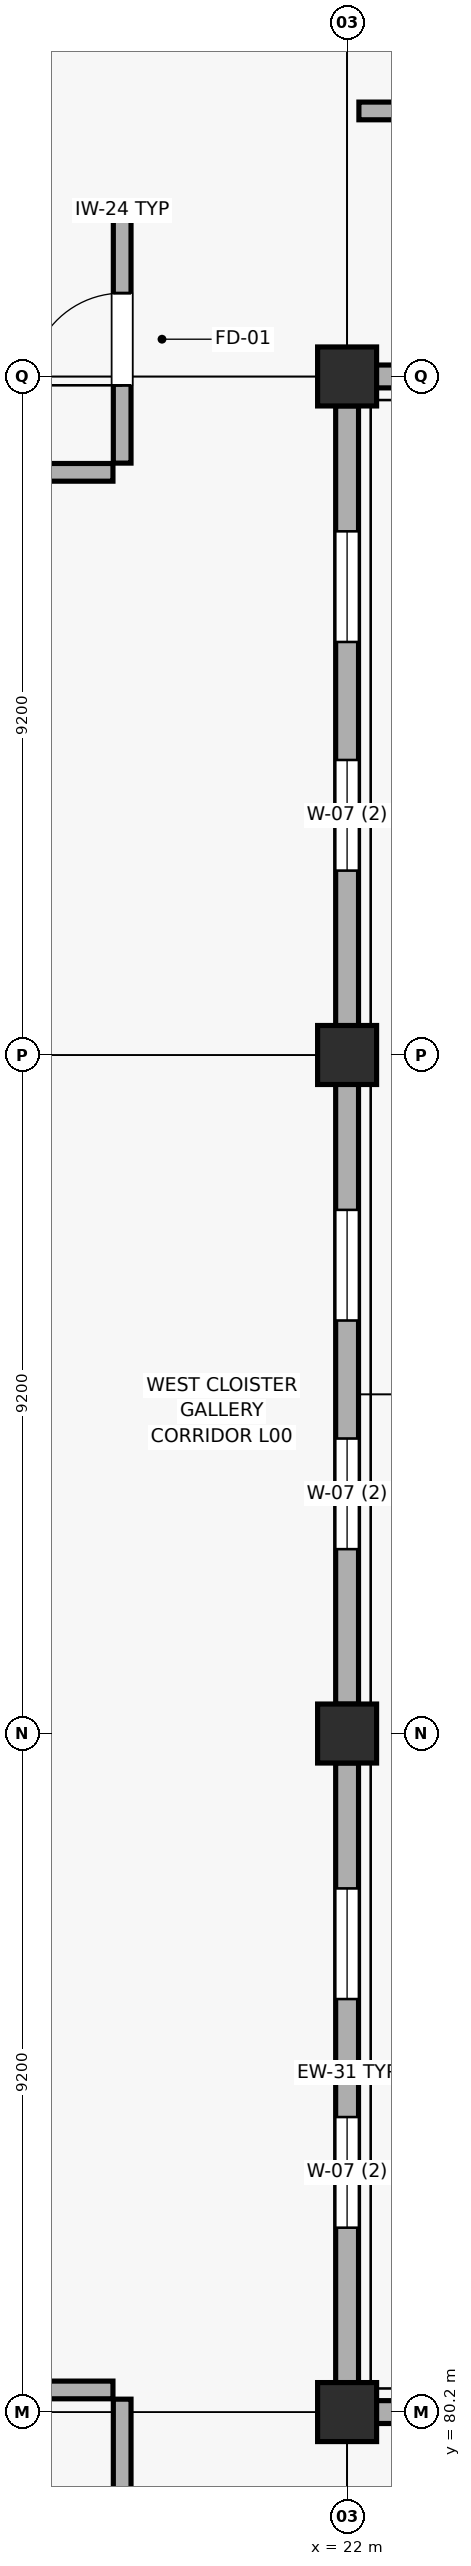
"""IFC4 building model, lengths in metres.
Left out: names, types, materials, properties, quantities, classifications, styles, units other than length and angle.
Written with IfcOpenShell. Run it as: python <this file> out.ifc"""

import sys

from ifc_helpers import new_model, si_unit, direction, frame, frame_2d, origin, origin_2d, place, context, subcontext, project, spatial, rectangle, extrude, element, fill, save


model = new_model("IFC4")
c1 = context("Model", 3, precision=1e-05, world=origin(), true_north=direction((0.0, 1.0)))
c2 = subcontext(c1, "Body", "Model", "MODEL_VIEW")
j1 = project(units=[si_unit("LENGTHUNIT", "METRE"), si_unit("PLANEANGLEUNIT", "RADIAN")], contexts=[c1])
p1 = place(None, origin())
s1 = spatial("IfcSite", under=j1, at=p1, CompositionType="ELEMENT")
p2 = place(p1, origin())
s2 = spatial("IfcBuilding", under=s1, at=p2, CompositionType="ELEMENT")
p3 = place(p2, origin())
s3 = spatial("IfcBuildingStorey", under=s2, at=p3, CompositionType="ELEMENT", Elevation=0.0)
for number, where, z_axis, x_axis in (
    (1, (22.0, 80.2, 0.0), (0.0, 0.0, 1.0), (1.0, 0.0, 0.0)),
    (2, (22.0, 89.4, 0.0), (0.0, 0.0, 1.0), (1.0, 0.0, 0.0)),
    (3, (22.0, 98.6, 0.0), (0.0, 0.0, 1.0), (1.0, 0.0, 0.0)),
    (4, (22.0, 107.8, 0.0), (0.0, 0.0, 1.0), (1.0, 0.0, 0.0)),
):
    element("IfcColumn", number, at=place(p3, frame(where, z_axis=z_axis, x_axis=x_axis)), inside=s3, PredefinedType="COLUMN", context=c2, shape_type="SweptSolid", body=[
        extrude(rectangle(XDim=0.8, YDim=0.8, at=origin_2d()), origin(), (0.0, 0.0, 1.0), 5.4),
    ])
p4 = place(p3, frame((22.398, 80.2, 0.0), z_axis=(0.0, 0.0, 1.0), x_axis=(1.0, 0.0, 0.0)))
e5 = element("IfcWall", 5, at=p4, inside=s3, PredefinedType="SOLIDWALL", context=c2, shape_type="SweptSolid", body=[
    extrude(rectangle(XDim=10.586, YDim=0.31, at=frame_2d((5.293, 0.0))), origin(), (0.0, 0.0, 1.0), 4.425),
])
p5 = place(p4, frame((2.302, 0.0, 0.95)))
e6 = element("IfcOpeningElement", 6, at=p5, cuts=e5, PredefinedType="OPENING", context=c2, shape_type="SweptSolid", body=[
    extrude(rectangle(XDim=1.65, YDim=2.25, at=frame_2d((0.825, 1.125))), frame((0.0, 0.165, 0.0), z_axis=(0.0, -1.0, 0.0), x_axis=(1.0, 0.0, 0.0)), (0.0, 0.0, 1.0), 0.33),
])
p6 = place(p4, frame((5.902, 0.0, 0.95)))
e7 = element("IfcOpeningElement", 7, at=p6, cuts=e5, PredefinedType="OPENING", context=c2, shape_type="SweptSolid", body=[
    extrude(rectangle(XDim=1.65, YDim=2.25, at=frame_2d((0.825, 1.125))), frame((0.0, 0.165, 0.0), z_axis=(0.0, -1.0, 0.0), x_axis=(1.0, 0.0, 0.0)), (0.0, 0.0, 1.0), 0.33),
])
p7 = place(p3, frame((22.398, 107.8, 0.0), z_axis=(0.0, 0.0, 1.0), x_axis=(1.0, 0.0, 0.0)))
e8 = element("IfcWall", 8, at=p7, inside=s3, PredefinedType="SOLIDWALL", context=c2, shape_type="SweptSolid", body=[
    extrude(rectangle(XDim=10.586, YDim=0.31, at=frame_2d((5.293, 0.0))), origin(), (0.0, 0.0, 1.0), 4.425),
])
p8 = place(p7, frame((2.302, 0.0, 0.95)))
e9 = element("IfcOpeningElement", 9, at=p8, cuts=e8, PredefinedType="OPENING", context=c2, shape_type="SweptSolid", body=[
    extrude(rectangle(XDim=1.65, YDim=2.25, at=frame_2d((0.825, 1.125))), frame((0.0, 0.165, 0.0), z_axis=(0.0, -1.0, 0.0), x_axis=(1.0, 0.0, 0.0)), (0.0, 0.0, 1.0), 0.33),
])
p9 = place(p7, frame((5.902, 0.0, 0.95)))
e10 = element("IfcOpeningElement", 10, at=p9, cuts=e8, PredefinedType="OPENING", context=c2, shape_type="SweptSolid", body=[
    extrude(rectangle(XDim=1.65, YDim=2.25, at=frame_2d((0.825, 1.125))), frame((0.0, 0.165, 0.0), z_axis=(0.0, -1.0, 0.0), x_axis=(1.0, 0.0, 0.0)), (0.0, 0.0, 1.0), 0.33),
])
p10 = place(p3, frame((22.0, 80.598, 0.0), z_axis=(0.0, 0.0, 1.0), x_axis=(0.0, 1.0, 0.0)))
e11 = element("IfcWall", 11, at=p10, inside=s3, PredefinedType="SOLIDWALL", context=c2, shape_type="SweptSolid", body=[
    extrude(rectangle(XDim=8.404, YDim=0.31, at=frame_2d((4.202, 0.0))), origin(), (0.0, 0.0, 1.0), 4.525),
])
p11 = place(p10, frame((2.102, 0.0, 0.95)))
e12 = element("IfcOpeningElement", 12, at=p11, cuts=e11, PredefinedType="OPENING", context=c2, shape_type="SweptSolid", body=[
    extrude(rectangle(XDim=1.5, YDim=2.25, at=frame_2d((0.75, 1.125))), frame((0.0, 0.165, 0.0), z_axis=(0.0, -1.0, 0.0), x_axis=(1.0, 0.0, 0.0)), (0.0, 0.0, 1.0), 0.33),
])
p12 = place(p10, frame((5.202, 0.0, 0.95)))
e13 = element("IfcOpeningElement", 13, at=p12, cuts=e11, PredefinedType="OPENING", context=c2, shape_type="SweptSolid", body=[
    extrude(rectangle(XDim=1.5, YDim=2.25, at=frame_2d((0.75, 1.125))), frame((0.0, 0.165, 0.0), z_axis=(0.0, -1.0, 0.0), x_axis=(1.0, 0.0, 0.0)), (0.0, 0.0, 1.0), 0.33),
])
p13 = place(p3, frame((22.0, 89.798, 0.0), z_axis=(0.0, 0.0, 1.0), x_axis=(0.0, 1.0, 0.0)))
e14 = element("IfcWall", 14, at=p13, inside=s3, PredefinedType="SOLIDWALL", context=c2, shape_type="SweptSolid", body=[
    extrude(rectangle(XDim=8.404, YDim=0.31, at=frame_2d((4.202, 0.0))), origin(), (0.0, 0.0, 1.0), 4.525),
])
p14 = place(p13, frame((2.102, 0.0, 0.95)))
e15 = element("IfcOpeningElement", 15, at=p14, cuts=e14, PredefinedType="OPENING", context=c2, shape_type="SweptSolid", body=[
    extrude(rectangle(XDim=1.5, YDim=2.25, at=frame_2d((0.75, 1.125))), frame((0.0, 0.165, 0.0), z_axis=(0.0, -1.0, 0.0), x_axis=(1.0, 0.0, 0.0)), (0.0, 0.0, 1.0), 0.33),
])
p15 = place(p13, frame((5.202, 0.0, 0.95)))
e16 = element("IfcOpeningElement", 16, at=p15, cuts=e14, PredefinedType="OPENING", context=c2, shape_type="SweptSolid", body=[
    extrude(rectangle(XDim=1.5, YDim=2.25, at=frame_2d((0.75, 1.125))), frame((0.0, 0.165, 0.0), z_axis=(0.0, -1.0, 0.0), x_axis=(1.0, 0.0, 0.0)), (0.0, 0.0, 1.0), 0.33),
])
p16 = place(p3, frame((22.0, 98.998, 0.0), z_axis=(0.0, 0.0, 1.0), x_axis=(0.0, 1.0, 0.0)))
e17 = element("IfcWall", 17, at=p16, inside=s3, PredefinedType="SOLIDWALL", context=c2, shape_type="SweptSolid", body=[
    extrude(rectangle(XDim=8.404, YDim=0.31, at=frame_2d((4.202, 0.0))), origin(), (0.0, 0.0, 1.0), 4.525),
])
p17 = place(p16, frame((2.102, 0.0, 0.95)))
e18 = element("IfcOpeningElement", 18, at=p17, cuts=e17, PredefinedType="OPENING", context=c2, shape_type="SweptSolid", body=[
    extrude(rectangle(XDim=1.5, YDim=2.25, at=frame_2d((0.75, 1.125))), frame((0.0, 0.165, 0.0), z_axis=(0.0, -1.0, 0.0), x_axis=(1.0, 0.0, 0.0)), (0.0, 0.0, 1.0), 0.33),
])
p18 = place(p16, frame((5.202, 0.0, 0.95)))
e19 = element("IfcOpeningElement", 19, at=p18, cuts=e17, PredefinedType="OPENING", context=c2, shape_type="SweptSolid", body=[
    extrude(rectangle(XDim=1.5, YDim=2.25, at=frame_2d((0.75, 1.125))), frame((0.0, 0.165, 0.0), z_axis=(0.0, -1.0, 0.0), x_axis=(1.0, 0.0, 0.0)), (0.0, 0.0, 1.0), 0.33),
])
p19 = place(p3, frame((0.195, 106.5, 0.0), z_axis=(0.0, 0.0, 1.0), x_axis=(1.0, 0.0, 0.0)))
e20 = element("IfcWall", 20, at=p19, inside=s3, PredefinedType="PARTITIONING", context=c2, shape_type="SweptSolid", body=[
    extrude(rectangle(XDim=18.63, YDim=0.24, at=frame_2d((9.315, 0.0))), origin(), (0.0, 0.0, 1.0), 4.525),
])
p20 = place(p19, frame((4.205, 0.0, 0.0)))
e21 = element("IfcOpeningElement", 21, at=p20, cuts=e20, PredefinedType="OPENING", context=c2, shape_type="SweptSolid", body=[
    extrude(rectangle(XDim=1.85, YDim=2.4, at=frame_2d((0.925, 1.2))), frame((0.0, 0.13, 0.0), z_axis=(0.0, -1.0, 0.0), x_axis=(1.0, 0.0, 0.0)), (0.0, 0.0, 1.0), 0.26),
])
p21 = place(p19, frame((13.805, 0.0, 0.0)))
e22 = element("IfcOpeningElement", 22, at=p21, cuts=e20, PredefinedType="OPENING", context=c2, shape_type="SweptSolid", body=[
    extrude(rectangle(XDim=1.25, YDim=2.2, at=frame_2d((0.625, 1.1))), frame((0.0, 0.13, 0.0), z_axis=(0.0, -1.0, 0.0), x_axis=(1.0, 0.0, 0.0)), (0.0, 0.0, 1.0), 0.26),
])
p22 = place(p3, frame((0.195, 80.5, 0.0), z_axis=(0.0, 0.0, 1.0), x_axis=(1.0, 0.0, 0.0)))
e23 = element("IfcWall", 23, at=p22, inside=s3, PredefinedType="PARTITIONING", context=c2, shape_type="SweptSolid", body=[
    extrude(rectangle(XDim=18.63, YDim=0.24, at=frame_2d((9.315, 0.0))), origin(), (0.0, 0.0, 1.0), 4.425),
])
p23 = place(p22, frame((13.805, 0.0, 0.0)))
e24 = element("IfcOpeningElement", 24, at=p23, cuts=e23, PredefinedType="OPENING", context=c2, shape_type="SweptSolid", body=[
    extrude(rectangle(XDim=1.25, YDim=2.2, at=frame_2d((0.625, 1.1))), frame((0.0, 0.13, 0.0), z_axis=(0.0, -1.0, 0.0), x_axis=(1.0, 0.0, 0.0)), (0.0, 0.0, 1.0), 0.26),
])
p24 = place(p3, frame((18.95, 106.625, 0.0), z_axis=(0.0, 0.0, 1.0), x_axis=(0.0, 1.0, 0.0)))
e25 = element("IfcWall", 25, at=p24, inside=s3, PredefinedType="PARTITIONING", context=c2, shape_type="SweptSolid", body=[
    extrude(rectangle(XDim=3.525, YDim=0.24, at=frame_2d((1.762, 0.0))), origin(), (0.0, 0.0, 1.0), 4.425),
])
p25 = place(p24, frame((1.055, 0.0, 0.0)))
e26 = element("IfcOpeningElement", 26, at=p25, cuts=e25, PredefinedType="OPENING", context=c2, shape_type="SweptSolid", body=[
    extrude(rectangle(XDim=1.25, YDim=2.2, at=frame_2d((0.625, 1.1))), frame((0.0, 0.13, 0.0), z_axis=(0.0, -1.0, 0.0), x_axis=(1.0, 0.0, 0.0)), (0.0, 0.0, 1.0), 0.26),
])
p26 = place(p3, frame((18.95, 76.85, 0.0), z_axis=(0.0, 0.0, 1.0), x_axis=(0.0, 1.0, 0.0)))
e27 = element("IfcWall", 27, at=p26, inside=s3, PredefinedType="PARTITIONING", context=c2, shape_type="SweptSolid", body=[
    extrude(rectangle(XDim=3.525, YDim=0.24, at=frame_2d((1.762, 0.0))), origin(), (0.0, 0.0, 1.0), 4.425),
])
p27 = place(p26, frame((1.05, 0.0, 0.0)))
e28 = element("IfcOpeningElement", 28, at=p27, cuts=e27, PredefinedType="OPENING", context=c2, shape_type="SweptSolid", body=[
    extrude(rectangle(XDim=1.25, YDim=2.2, at=frame_2d((0.625, 1.1))), frame((0.0, 0.13, 0.0), z_axis=(0.0, -1.0, 0.0), x_axis=(1.0, 0.0, 0.0)), (0.0, 0.0, 1.0), 0.26),
])
p28 = place(p3, frame((22.16, 111.4, 0.0), z_axis=(0.0, 0.0, 1.0), x_axis=(1.0, 0.0, 0.0)))
e29 = element("IfcWall", 29, at=p28, inside=s3, PredefinedType="PARTITIONING", context=c2, shape_type="SweptSolid", body=[
    extrude(rectangle(XDim=43.68, YDim=0.24, at=frame_2d((21.84, 0.0))), origin(), (0.0, 0.0, 1.0), 4.525),
])
p29 = place(p28, frame((3.1, 0.0, 0.0)))
e30 = element("IfcOpeningElement", 30, at=p29, cuts=e29, PredefinedType="OPENING", context=c2, shape_type="SweptSolid", body=[
    extrude(rectangle(XDim=1.15, YDim=2.2, at=frame_2d((0.575, 1.1))), frame((0.0, 0.13, 0.0), z_axis=(0.0, -1.0, 0.0), x_axis=(1.0, 0.0, 0.0)), (0.0, 0.0, 1.0), 0.26),
])
p30 = place(p28, frame((15.2, 0.0, 0.0)))
e31 = element("IfcOpeningElement", 31, at=p30, cuts=e29, PredefinedType="OPENING", context=c2, shape_type="SweptSolid", body=[
    extrude(rectangle(XDim=1.85, YDim=2.4, at=frame_2d((0.925, 1.2))), frame((0.0, 0.13, 0.0), z_axis=(0.0, -1.0, 0.0), x_axis=(1.0, 0.0, 0.0)), (0.0, 0.0, 1.0), 0.26),
])
p31 = place(p28, frame((33.4, 0.0, 0.0)))
e32 = element("IfcOpeningElement", 32, at=p31, cuts=e29, PredefinedType="OPENING", context=c2, shape_type="SweptSolid", body=[
    extrude(rectangle(XDim=1.85, YDim=2.4, at=frame_2d((0.925, 1.2))), frame((0.0, 0.13, 0.0), z_axis=(0.0, -1.0, 0.0), x_axis=(1.0, 0.0, 0.0)), (0.0, 0.0, 1.0), 0.26),
])
p32 = place(p11, origin())
e33 = element("IfcWindow", 33, at=p32, inside=s3, PartitioningType="SINGLE_PANEL", PredefinedType="WINDOW", context=c2, shape_type="SweptSolid", body=[
    extrude(rectangle(XDim=1.5, YDim=2.25, at=frame_2d((0.75, 1.125))), frame((0.0, 0.03, 0.0), z_axis=(0.0, -1.0, 0.0), x_axis=(1.0, 0.0, 0.0)), (0.0, 0.0, 1.0), 0.06),
])
fill(e12, e33)
p33 = place(p12, origin())
e34 = element("IfcWindow", 34, at=p33, inside=s3, PartitioningType="SINGLE_PANEL", PredefinedType="WINDOW", context=c2, shape_type="SweptSolid", body=[
    extrude(rectangle(XDim=1.5, YDim=2.25, at=frame_2d((0.75, 1.125))), frame((0.0, 0.03, 0.0), z_axis=(0.0, -1.0, 0.0), x_axis=(1.0, 0.0, 0.0)), (0.0, 0.0, 1.0), 0.06),
])
fill(e13, e34)
p34 = place(p14, origin())
e35 = element("IfcWindow", 35, at=p34, inside=s3, PartitioningType="SINGLE_PANEL", PredefinedType="WINDOW", context=c2, shape_type="SweptSolid", body=[
    extrude(rectangle(XDim=1.5, YDim=2.25, at=frame_2d((0.75, 1.125))), frame((0.0, 0.03, 0.0), z_axis=(0.0, -1.0, 0.0), x_axis=(1.0, 0.0, 0.0)), (0.0, 0.0, 1.0), 0.06),
])
fill(e15, e35)
p35 = place(p15, origin())
e36 = element("IfcWindow", 36, at=p35, inside=s3, PartitioningType="SINGLE_PANEL", PredefinedType="WINDOW", context=c2, shape_type="SweptSolid", body=[
    extrude(rectangle(XDim=1.5, YDim=2.25, at=frame_2d((0.75, 1.125))), frame((0.0, 0.03, 0.0), z_axis=(0.0, -1.0, 0.0), x_axis=(1.0, 0.0, 0.0)), (0.0, 0.0, 1.0), 0.06),
])
fill(e16, e36)
p36 = place(p17, origin())
e37 = element("IfcWindow", 37, at=p36, inside=s3, PartitioningType="SINGLE_PANEL", PredefinedType="WINDOW", context=c2, shape_type="SweptSolid", body=[
    extrude(rectangle(XDim=1.5, YDim=2.25, at=frame_2d((0.75, 1.125))), frame((0.0, 0.03, 0.0), z_axis=(0.0, -1.0, 0.0), x_axis=(1.0, 0.0, 0.0)), (0.0, 0.0, 1.0), 0.06),
])
fill(e18, e37)
p37 = place(p18, origin())
e38 = element("IfcWindow", 38, at=p37, inside=s3, PartitioningType="SINGLE_PANEL", PredefinedType="WINDOW", context=c2, shape_type="SweptSolid", body=[
    extrude(rectangle(XDim=1.5, YDim=2.25, at=frame_2d((0.75, 1.125))), frame((0.0, 0.03, 0.0), z_axis=(0.0, -1.0, 0.0), x_axis=(1.0, 0.0, 0.0)), (0.0, 0.0, 1.0), 0.06),
])
fill(e19, e38)
p38 = place(p25, origin())
e39 = element("IfcDoor", 39, at=p38, inside=s3, OperationType="SINGLE_SWING_LEFT", PredefinedType="DOOR", context=c2, shape_type="SweptSolid", body=[
    extrude(rectangle(XDim=1.25, YDim=2.2, at=frame_2d((0.625, 1.1))), frame((0.0, 0.025, 0.0), z_axis=(0.0, -1.0, 0.0), x_axis=(1.0, 0.0, 0.0)), (0.0, 0.0, 1.0), 0.05),
])
fill(e26, e39)
save(model, sys.argv[1])
